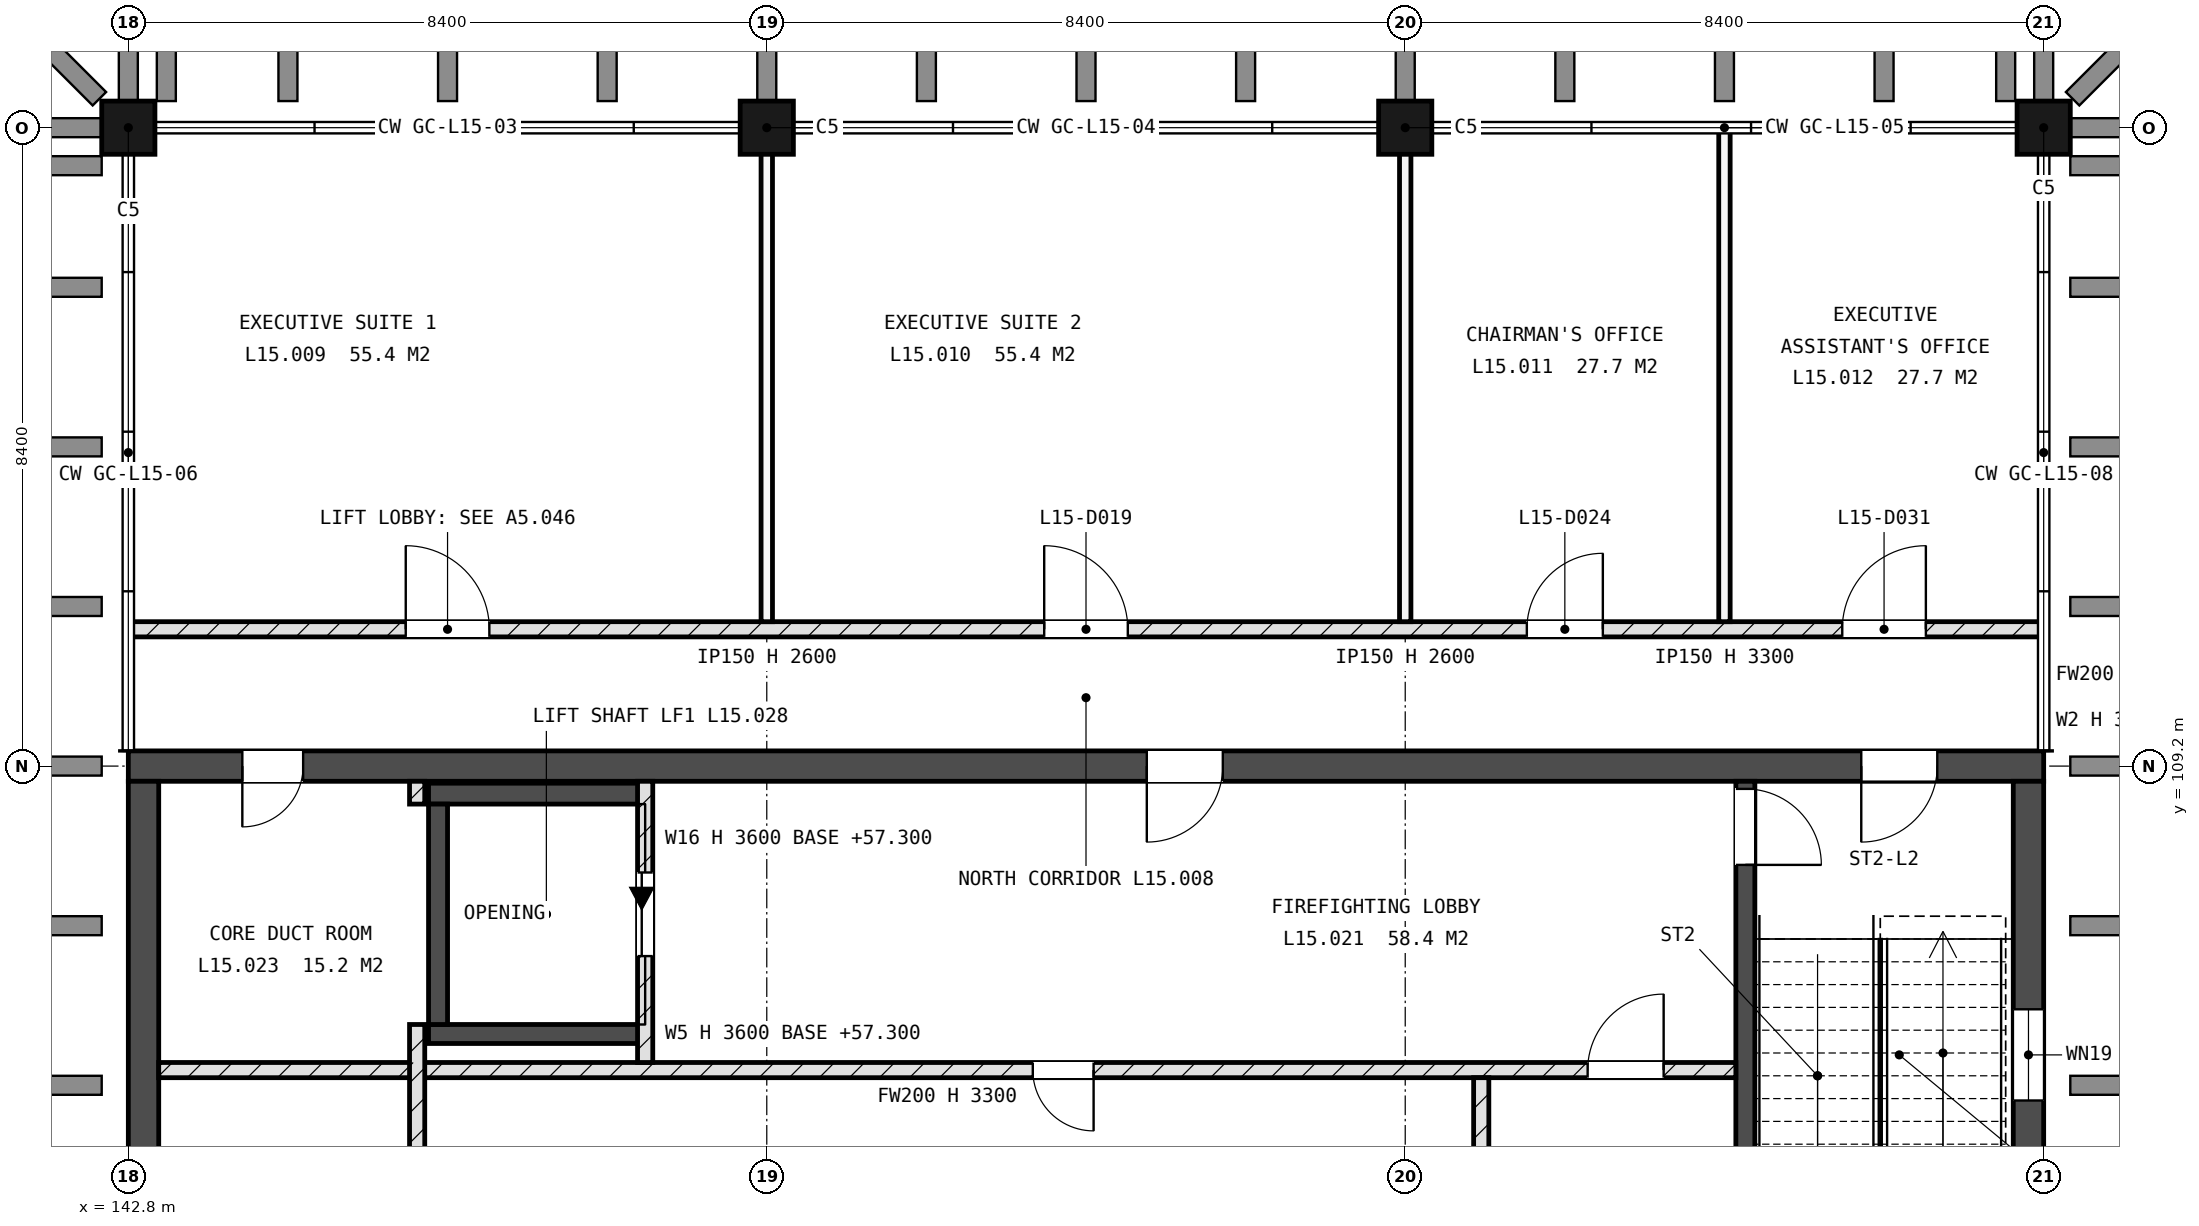
"""IFC4 building model, lengths in metres.
Left out: names, types, materials, properties, quantities, classifications, styles, units other than length and angle.
Written with IfcOpenShell. Run it as: python <this file> out.ifc"""

import sys

from ifc_helpers import new_model, si_unit, direction, frame, frame_2d, origin, origin_2d, place, context, subcontext, project, spatial, rectangle, extrude, element, fill, save


model = new_model("IFC4")
c1 = context("Model", 3, precision=1e-05, world=origin(), true_north=direction((0.0, 1.0)))
c2 = subcontext(c1, "Body", "Model", "MODEL_VIEW")
j1 = project(units=[si_unit("LENGTHUNIT", "METRE"), si_unit("PLANEANGLEUNIT", "RADIAN")], contexts=[c1])
p1 = place(None, origin())
s1 = spatial("IfcSite", under=j1, at=p1, CompositionType="ELEMENT")
p2 = place(p1, origin())
s2 = spatial("IfcBuilding", under=s1, at=p2, CompositionType="ELEMENT")
p3 = place(p2, frame((0.0, 0.0, 57.6)))
s3 = spatial("IfcBuildingStorey", under=s2, at=p3, CompositionType="ELEMENT", Elevation=57.6)
for number, where, z_axis, x_axis in (
    (1, (142.8, 117.6, -0.3), (0.0, 0.0, 1.0), (1.0, 0.0, 0.0)),
    (2, (151.2, 117.6, -0.3), (0.0, 0.0, 1.0), (1.0, 0.0, 0.0)),
    (3, (159.6, 117.6, -0.3), (0.0, 0.0, 1.0), (1.0, 0.0, 0.0)),
    (4, (168.0, 117.6, -0.3), (0.0, 0.0, 1.0), (1.0, 0.0, 0.0)),
):
    element("IfcColumn", number, at=place(p3, frame(where, z_axis=z_axis, x_axis=x_axis)), inside=s3, PredefinedType="COLUMN", context=c2, shape_type="SweptSolid", body=[
        extrude(rectangle(XDim=0.7, YDim=0.7, at=origin_2d()), origin(), (0.0, 0.0, 1.0), 3.6),
    ])
p4 = place(p3, frame((142.8, 109.2, -0.3), z_axis=(0.0, 0.0, 1.0), x_axis=(1.0, 0.0, 0.0)))
e5 = element("IfcWall", 5, at=p4, inside=s3, PredefinedType="SHEAR", context=c2, shape_type="SweptSolid", body=[
    extrude(rectangle(XDim=25.2, YDim=0.4, at=frame_2d((12.6, 0.0))), origin(), (0.0, 0.0, 1.0), 3.6),
])
p5 = place(p4, frame((22.8, 0.0, 0.3)))
e6 = element("IfcOpeningElement", 6, at=p5, cuts=e5, PredefinedType="OPENING", context=c2, shape_type="SweptSolid", body=[
    extrude(rectangle(XDim=1.0, YDim=2.1, at=frame_2d((0.5, 1.05))), frame((0.0, 0.21, 0.0), z_axis=(0.0, -1.0, 0.0), x_axis=(1.0, 0.0, 0.0)), (0.0, 0.0, 1.0), 0.42),
])
p6 = place(p4, frame((1.5, 0.0, 0.3)))
e7 = element("IfcOpeningElement", 7, at=p6, cuts=e5, PredefinedType="OPENING", context=c2, shape_type="SweptSolid", body=[
    extrude(rectangle(XDim=0.8, YDim=2.1, at=frame_2d((0.4, 1.05))), frame((0.0, 0.21, 0.0), z_axis=(0.0, -1.0, 0.0), x_axis=(1.0, 0.0, 0.0)), (0.0, 0.0, 1.0), 0.42),
])
p7 = place(p4, frame((13.4, 0.0, 0.3)))
e8 = element("IfcOpeningElement", 8, at=p7, cuts=e5, PredefinedType="OPENING", context=c2, shape_type="SweptSolid", body=[
    extrude(rectangle(XDim=1.0, YDim=2.1, at=frame_2d((0.5, 1.05))), frame((0.0, 0.21, 0.0), z_axis=(0.0, -1.0, 0.0), x_axis=(1.0, 0.0, 0.0)), (0.0, 0.0, 1.0), 0.42),
])
p8 = place(p3, frame((143.0, 92.6, -0.3), z_axis=(0.0, 0.0, 1.0), x_axis=(0.0, 1.0, 0.0)))
e9 = element("IfcWall", 9, at=p8, inside=s3, PredefinedType="SHEAR", context=c2, shape_type="SweptSolid", body=[
    extrude(rectangle(XDim=16.4, YDim=0.4, at=frame_2d((8.2, 0.0))), origin(), (0.0, 0.0, 1.0), 3.6),
])
p9 = place(p8, frame((3.0, 0.0, 1.9)))
e10 = element("IfcOpeningElement", 10, at=p9, cuts=e9, PredefinedType="OPENING", context=c2, shape_type="SweptSolid", body=[
    extrude(rectangle(XDim=1.2, YDim=0.9, at=frame_2d((0.6, 0.45))), frame((0.0, 0.21, 0.0), z_axis=(0.0, -1.0, 0.0), x_axis=(1.0, 0.0, 0.0)), (0.0, 0.0, 1.0), 0.42),
])
p10 = place(p3, frame((167.8, 92.6, -0.3), z_axis=(0.0, 0.0, 1.0), x_axis=(0.0, 1.0, 0.0)))
e11 = element("IfcWall", 11, at=p10, inside=s3, PredefinedType="SHEAR", context=c2, shape_type="SweptSolid", body=[
    extrude(rectangle(XDim=16.4, YDim=0.4, at=frame_2d((8.2, 0.0))), origin(), (0.0, 0.0, 1.0), 3.6),
])
p11 = place(p10, frame((12.2, 0.0, 1.9)))
e12 = element("IfcOpeningElement", 12, at=p11, cuts=e11, PredefinedType="OPENING", context=c2, shape_type="SweptSolid", body=[
    extrude(rectangle(XDim=1.2, YDim=0.9, at=frame_2d((0.6, 0.45))), frame((0.0, 0.21, 0.0), z_axis=(0.0, -1.0, 0.0), x_axis=(1.0, 0.0, 0.0)), (0.0, 0.0, 1.0), 0.42),
])
p12 = place(p3, frame((164.075, 101.35, -0.3), z_axis=(0.0, 0.0, 1.0), x_axis=(0.0, 1.0, 0.0)))
e13 = element("IfcWall", 13, at=p12, inside=s3, PredefinedType="SHEAR", context=c2, shape_type="SweptSolid", body=[
    extrude(rectangle(XDim=7.65, YDim=0.25, at=frame_2d((3.825, 0.0))), origin(), (0.0, 0.0, 1.0), 3.6),
])
p13 = place(p12, frame((6.55, 0.0, 0.3)))
e14 = element("IfcOpeningElement", 14, at=p13, cuts=e13, PredefinedType="OPENING", context=c2, shape_type="SweptSolid", body=[
    extrude(rectangle(XDim=1.0, YDim=2.1, at=frame_2d((0.5, 1.05))), frame((0.0, 0.135, 0.0), z_axis=(0.0, -1.0, 0.0), x_axis=(1.0, 0.0, 0.0)), (0.0, 0.0, 1.0), 0.27),
])
p14 = place(p3, frame((146.75, 105.675, -0.3), z_axis=(0.0, 0.0, 1.0), x_axis=(1.0, 0.0, 0.0)))
e15 = element("IfcWall", 15, at=p14, inside=s3, PredefinedType="SHEAR", context=c2, shape_type="SweptSolid", body=[
    extrude(rectangle(XDim=2.85, YDim=0.25, at=frame_2d((1.425, 0.0))), origin(), (0.0, 0.0, 1.0), 3.6),
])
p15 = place(p3, frame((146.75, 108.837, -0.3), z_axis=(0.0, 0.0, 1.0), x_axis=(1.0, 0.0, 0.0)))
e16 = element("IfcWall", 16, at=p15, inside=s3, PredefinedType="SHEAR", context=c2, shape_type="SweptSolid", body=[
    extrude(rectangle(XDim=2.85, YDim=0.275, at=frame_2d((1.425, 0.0))), origin(), (0.0, 0.0, 1.0), 3.6),
])
p16 = place(p3, frame((146.875, 105.8, -0.3), z_axis=(0.0, 0.0, 1.0), x_axis=(0.0, 1.0, 0.0)))
e17 = element("IfcWall", 17, at=p16, inside=s3, PredefinedType="SHEAR", context=c2, shape_type="SweptSolid", body=[
    extrude(rectangle(XDim=2.9, YDim=0.25, at=frame_2d((1.45, 0.0))), origin(), (0.0, 0.0, 1.0), 3.6),
])
p17 = place(p3, frame((143.2, 105.2, 0.0), z_axis=(0.0, 0.0, 1.0), x_axis=(1.0, 0.0, 0.0)))
e18 = element("IfcWall", 18, at=p17, inside=s3, PredefinedType="SOLIDWALL", context=c2, shape_type="SweptSolid", body=[
    extrude(rectangle(XDim=20.75, YDim=0.2, at=frame_2d((10.375, 0.0))), origin(), (0.0, 0.0, 1.0), 3.3),
])
p18 = place(p17, frame((11.5, 0.0, 0.0)))
e19 = element("IfcOpeningElement", 19, at=p18, cuts=e18, PredefinedType="OPENING", context=c2, shape_type="SweptSolid", body=[
    extrude(rectangle(XDim=0.8, YDim=2.1, at=frame_2d((0.4, 1.05))), frame((0.0, 0.11, 0.0), z_axis=(0.0, -1.0, 0.0), x_axis=(1.0, 0.0, 0.0)), (0.0, 0.0, 1.0), 0.22),
])
p19 = place(p17, frame((18.8, 0.0, 0.0)))
e20 = element("IfcOpeningElement", 20, at=p19, cuts=e18, PredefinedType="OPENING", context=c2, shape_type="SweptSolid", body=[
    extrude(rectangle(XDim=1.0, YDim=2.1, at=frame_2d((0.5, 1.05))), frame((0.0, 0.11, 0.0), z_axis=(0.0, -1.0, 0.0), x_axis=(1.0, 0.0, 0.0)), (0.0, 0.0, 1.0), 0.22),
])
p20 = place(p3, frame((142.8, 111.0, 0.0), z_axis=(0.0, 0.0, 1.0), x_axis=(1.0, 0.0, 0.0)))
e21 = element("IfcWall", 21, at=p20, inside=s3, PredefinedType="SOLIDWALL", context=c2, shape_type="SweptSolid", body=[
    extrude(rectangle(XDim=25.2, YDim=0.2, at=frame_2d((12.6, 0.0))), origin(), (0.0, 0.0, 1.0), 3.3),
])
p21 = place(p20, frame((3.65, 0.0, 0.0)))
e22 = element("IfcOpeningElement", 22, at=p21, cuts=e21, PredefinedType="OPENING", context=c2, shape_type="SweptSolid", body=[
    extrude(rectangle(XDim=1.1, YDim=2.25, at=frame_2d((0.55, 1.125))), frame((0.0, 0.11, 0.0), z_axis=(0.0, -1.0, 0.0), x_axis=(1.0, 0.0, 0.0)), (0.0, 0.0, 1.0), 0.22),
])
p22 = place(p20, frame((12.05, 0.0, 0.0)))
e23 = element("IfcOpeningElement", 23, at=p22, cuts=e21, PredefinedType="OPENING", context=c2, shape_type="SweptSolid", body=[
    extrude(rectangle(XDim=1.1, YDim=2.25, at=frame_2d((0.55, 1.125))), frame((0.0, 0.11, 0.0), z_axis=(0.0, -1.0, 0.0), x_axis=(1.0, 0.0, 0.0)), (0.0, 0.0, 1.0), 0.22),
])
p23 = place(p20, frame((18.4, 0.0, 0.0)))
e24 = element("IfcOpeningElement", 24, at=p23, cuts=e21, PredefinedType="OPENING", context=c2, shape_type="SweptSolid", body=[
    extrude(rectangle(XDim=1.0, YDim=2.1, at=frame_2d((0.5, 1.05))), frame((0.0, 0.11, 0.0), z_axis=(0.0, -1.0, 0.0), x_axis=(1.0, 0.0, 0.0)), (0.0, 0.0, 1.0), 0.22),
])
p24 = place(p20, frame((22.55, 0.0, 0.0)))
e25 = element("IfcOpeningElement", 25, at=p24, cuts=e21, PredefinedType="OPENING", context=c2, shape_type="SweptSolid", body=[
    extrude(rectangle(XDim=1.1, YDim=2.25, at=frame_2d((0.55, 1.125))), frame((0.0, 0.11, 0.0), z_axis=(0.0, -1.0, 0.0), x_axis=(1.0, 0.0, 0.0)), (0.0, 0.0, 1.0), 0.22),
])
p25 = place(p3, frame((146.6, 100.5, 0.0), z_axis=(0.0, 0.0, 1.0), x_axis=(0.0, 1.0, 0.0)))
e26 = element("IfcWall", 26, at=p25, inside=s3, PredefinedType="SOLIDWALL", context=c2, shape_type="SweptSolid", body=[
    extrude(rectangle(XDim=5.3, YDim=0.2, at=frame_2d((2.65, 0.0))), origin(), (0.0, 0.0, 1.0), 3.3),
])
p26 = place(p25, frame((1.8, 0.0, 0.0)))
e27 = element("IfcOpeningElement", 27, at=p26, cuts=e26, PredefinedType="OPENING", context=c2, shape_type="SweptSolid", body=[
    extrude(rectangle(XDim=1.0, YDim=2.1, at=frame_2d((0.5, 1.05))), frame((0.0, 0.11, 0.0), z_axis=(0.0, -1.0, 0.0), x_axis=(1.0, 0.0, 0.0)), (0.0, 0.0, 1.0), 0.22),
])
p27 = place(p3, frame((146.6, 108.7, 0.0), z_axis=(0.0, 0.0, 1.0), x_axis=(0.0, 1.0, 0.0)))
e28 = element("IfcWall", 28, at=p27, inside=s3, PredefinedType="SOLIDWALL", context=c2, shape_type="SweptSolid", body=[
    extrude(rectangle(XDim=0.3, YDim=0.2, at=frame_2d((0.15, 0.0))), origin(), (0.0, 0.0, 1.0), 3.3),
])
p28 = place(p3, frame((149.6, 105.3, 0.0), z_axis=(0.0, 0.0, 1.0), x_axis=(0.0, 1.0, 0.0)))
e29 = element("IfcWall", 29, at=p28, inside=s3, PredefinedType="SOLIDWALL", context=c2, shape_type="SweptSolid", body=[
    extrude(rectangle(XDim=3.7, YDim=0.2, at=frame_2d((1.85, 0.0))), origin(), (0.0, 0.0, 1.0), 3.3),
])
p29 = place(p28, frame((1.4, 0.0, 0.0)))
e30 = element("IfcOpeningElement", 30, at=p29, cuts=e29, PredefinedType="OPENING", context=c2, shape_type="SweptSolid", body=[
    extrude(rectangle(XDim=1.1, YDim=2.1, at=frame_2d((0.55, 1.05))), frame((0.0, 0.11, 0.0), z_axis=(0.0, -1.0, 0.0), x_axis=(1.0, 0.0, 0.0)), (0.0, 0.0, 1.0), 0.22),
])
for number, where, z_axis, x_axis in (
    (31, (151.2, 111.1, 0.0), (0.0, 0.0, 1.0), (0.0, 1.0, 0.0)),
    (32, (159.6, 111.1, 0.0), (0.0, 0.0, 1.0), (0.0, 1.0, 0.0)),
):
    element("IfcWall", number, at=place(p3, frame(where, z_axis=z_axis, x_axis=x_axis)), inside=s3, PredefinedType="PARTITIONING", context=c2, shape_type="SweptSolid", body=[
        extrude(rectangle(XDim=6.5, YDim=0.15, at=frame_2d((3.25, 0.0))), origin(), (0.0, 0.0, 1.0), 2.6),
    ])
p30 = place(p3, frame((160.6, 92.6, 0.0), z_axis=(0.0, 0.0, 1.0), x_axis=(0.0, 1.0, 0.0)))
e33 = element("IfcWall", 33, at=p30, inside=s3, PredefinedType="SOLIDWALL", context=c2, shape_type="SweptSolid", body=[
    extrude(rectangle(XDim=12.5, YDim=0.2, at=frame_2d((6.25, 0.0))), origin(), (0.0, 0.0, 1.0), 3.3),
])
p31 = place(p30, frame((5.1, 0.0, 0.0)))
e34 = element("IfcOpeningElement", 34, at=p31, cuts=e33, PredefinedType="OPENING", context=c2, shape_type="SweptSolid", body=[
    extrude(rectangle(XDim=0.8, YDim=2.1, at=frame_2d((0.4, 1.05))), frame((0.0, 0.11, 0.0), z_axis=(0.0, -1.0, 0.0), x_axis=(1.0, 0.0, 0.0)), (0.0, 0.0, 1.0), 0.22),
])
p32 = place(p30, frame((0.8, 0.0, 0.0)))
e35 = element("IfcOpeningElement", 35, at=p32, cuts=e33, PredefinedType="OPENING", context=c2, shape_type="SweptSolid", body=[
    extrude(rectangle(XDim=1.0, YDim=2.1, at=frame_2d((0.5, 1.05))), frame((0.0, 0.11, 0.0), z_axis=(0.0, -1.0, 0.0), x_axis=(1.0, 0.0, 0.0)), (0.0, 0.0, 1.0), 0.22),
])
p33 = place(p3, frame((163.8, 111.1, 0.0), z_axis=(0.0, 0.0, 1.0), x_axis=(0.0, 1.0, 0.0)))
e36 = element("IfcWall", 36, at=p33, inside=s3, PredefinedType="PARTITIONING", context=c2, shape_type="SweptSolid", body=[
    extrude(rectangle(XDim=6.5, YDim=0.15, at=frame_2d((3.25, 0.0))), origin(), (0.0, 0.0, 1.0), 3.3),
])
p34 = place(p11, origin())
e37 = element("IfcWindow", 37, at=p34, inside=s3, PartitioningType="SINGLE_PANEL", PredefinedType="WINDOW", context=c2, shape_type="SweptSolid", body=[
    extrude(rectangle(XDim=1.2, YDim=0.9, at=frame_2d((0.6, 0.45))), frame((0.0, 0.03, 0.0), z_axis=(0.0, -1.0, 0.0), x_axis=(1.0, 0.0, 0.0)), (0.0, 0.0, 1.0), 0.06),
])
fill(e12, e37)
p35 = place(p29, origin())
e38 = element("IfcDoor", 38, at=p35, inside=s3, OperationType="SLIDING_TO_LEFT", PredefinedType="DOOR", context=c2, shape_type="SweptSolid", body=[
    extrude(rectangle(XDim=1.1, YDim=2.1, at=frame_2d((0.55, 1.05))), frame((0.0, 0.025, 0.0), z_axis=(0.0, -1.0, 0.0), x_axis=(1.0, 0.0, 0.0)), (0.0, 0.0, 1.0), 0.05),
])
fill(e30, e38)
p36 = place(p13, origin())
e39 = element("IfcDoor", 39, at=p36, inside=s3, OperationType="SINGLE_SWING_LEFT", PredefinedType="DOOR", context=c2, shape_type="SweptSolid", body=[
    extrude(rectangle(XDim=1.0, YDim=2.1, at=frame_2d((0.5, 1.05))), frame((0.0, 0.025, 0.0), z_axis=(0.0, -1.0, 0.0), x_axis=(1.0, 0.0, 0.0)), (0.0, 0.0, 1.0), 0.05),
])
fill(e14, e39)
p37 = place(p5, origin())
e40 = element("IfcDoor", 40, at=p37, inside=s3, OperationType="SINGLE_SWING_LEFT", PredefinedType="DOOR", context=c2, shape_type="SweptSolid", body=[
    extrude(rectangle(XDim=1.0, YDim=2.1, at=frame_2d((0.5, 1.05))), frame((0.0, 0.025, 0.0), z_axis=(0.0, -1.0, 0.0), x_axis=(1.0, 0.0, 0.0)), (0.0, 0.0, 1.0), 0.05),
])
fill(e6, e40)
p38 = place(p21, origin())
e41 = element("IfcDoor", 41, at=p38, inside=s3, OperationType="SINGLE_SWING_RIGHT", PredefinedType="DOOR", context=c2, shape_type="SweptSolid", body=[
    extrude(rectangle(XDim=1.1, YDim=2.25, at=frame_2d((0.55, 1.125))), frame((0.0, 0.025, 0.0), z_axis=(0.0, -1.0, 0.0), x_axis=(1.0, 0.0, 0.0)), (0.0, 0.0, 1.0), 0.05),
])
fill(e22, e41)
p39 = place(p22, origin())
e42 = element("IfcDoor", 42, at=p39, inside=s3, OperationType="SINGLE_SWING_RIGHT", PredefinedType="DOOR", context=c2, shape_type="SweptSolid", body=[
    extrude(rectangle(XDim=1.1, YDim=2.25, at=frame_2d((0.55, 1.125))), frame((0.0, 0.025, 0.0), z_axis=(0.0, -1.0, 0.0), x_axis=(1.0, 0.0, 0.0)), (0.0, 0.0, 1.0), 0.05),
])
fill(e23, e42)
p40 = place(p23, origin())
e43 = element("IfcDoor", 43, at=p40, inside=s3, OperationType="SINGLE_SWING_LEFT", PredefinedType="DOOR", context=c2, shape_type="SweptSolid", body=[
    extrude(rectangle(XDim=1.0, YDim=2.1, at=frame_2d((0.5, 1.05))), frame((0.0, 0.025, 0.0), z_axis=(0.0, -1.0, 0.0), x_axis=(1.0, 0.0, 0.0)), (0.0, 0.0, 1.0), 0.05),
])
fill(e24, e43)
p41 = place(p24, origin())
e44 = element("IfcDoor", 44, at=p41, inside=s3, OperationType="SINGLE_SWING_LEFT", PredefinedType="DOOR", context=c2, shape_type="SweptSolid", body=[
    extrude(rectangle(XDim=1.1, YDim=2.25, at=frame_2d((0.55, 1.125))), frame((0.0, 0.025, 0.0), z_axis=(0.0, -1.0, 0.0), x_axis=(1.0, 0.0, 0.0)), (0.0, 0.0, 1.0), 0.05),
])
fill(e25, e44)
p42 = place(p18, origin())
e45 = element("IfcDoor", 45, at=p42, inside=s3, OperationType="SINGLE_SWING_RIGHT", PredefinedType="DOOR", context=c2, shape_type="SweptSolid", body=[
    extrude(rectangle(XDim=0.8, YDim=2.1, at=frame_2d((0.4, 1.05))), frame((0.0, 0.025, 0.0), z_axis=(0.0, -1.0, 0.0), x_axis=(1.0, 0.0, 0.0)), (0.0, 0.0, 1.0), 0.05),
])
fill(e19, e45)
p43 = place(p6, origin())
e46 = element("IfcDoor", 46, at=p43, inside=s3, OperationType="SINGLE_SWING_LEFT", PredefinedType="DOOR", context=c2, shape_type="SweptSolid", body=[
    extrude(rectangle(XDim=0.8, YDim=2.1, at=frame_2d((0.4, 1.05))), frame((0.0, 0.025, 0.0), z_axis=(0.0, -1.0, 0.0), x_axis=(1.0, 0.0, 0.0)), (0.0, 0.0, 1.0), 0.05),
])
fill(e7, e46)
p44 = place(p7, origin())
e47 = element("IfcDoor", 47, at=p44, inside=s3, OperationType="SINGLE_SWING_LEFT", PredefinedType="DOOR", context=c2, shape_type="SweptSolid", body=[
    extrude(rectangle(XDim=1.0, YDim=2.1, at=frame_2d((0.5, 1.05))), frame((0.0, 0.025, 0.0), z_axis=(0.0, -1.0, 0.0), x_axis=(1.0, 0.0, 0.0)), (0.0, 0.0, 1.0), 0.05),
])
fill(e8, e47)
p45 = place(p19, origin())
e48 = element("IfcDoor", 48, at=p45, inside=s3, OperationType="SINGLE_SWING_LEFT", PredefinedType="DOOR", context=c2, shape_type="SweptSolid", body=[
    extrude(rectangle(XDim=1.0, YDim=2.1, at=frame_2d((0.5, 1.05))), frame((0.0, 0.025, 0.0), z_axis=(0.0, -1.0, 0.0), x_axis=(1.0, 0.0, 0.0)), (0.0, 0.0, 1.0), 0.05),
])
fill(e20, e48)
save(model, sys.argv[1])
